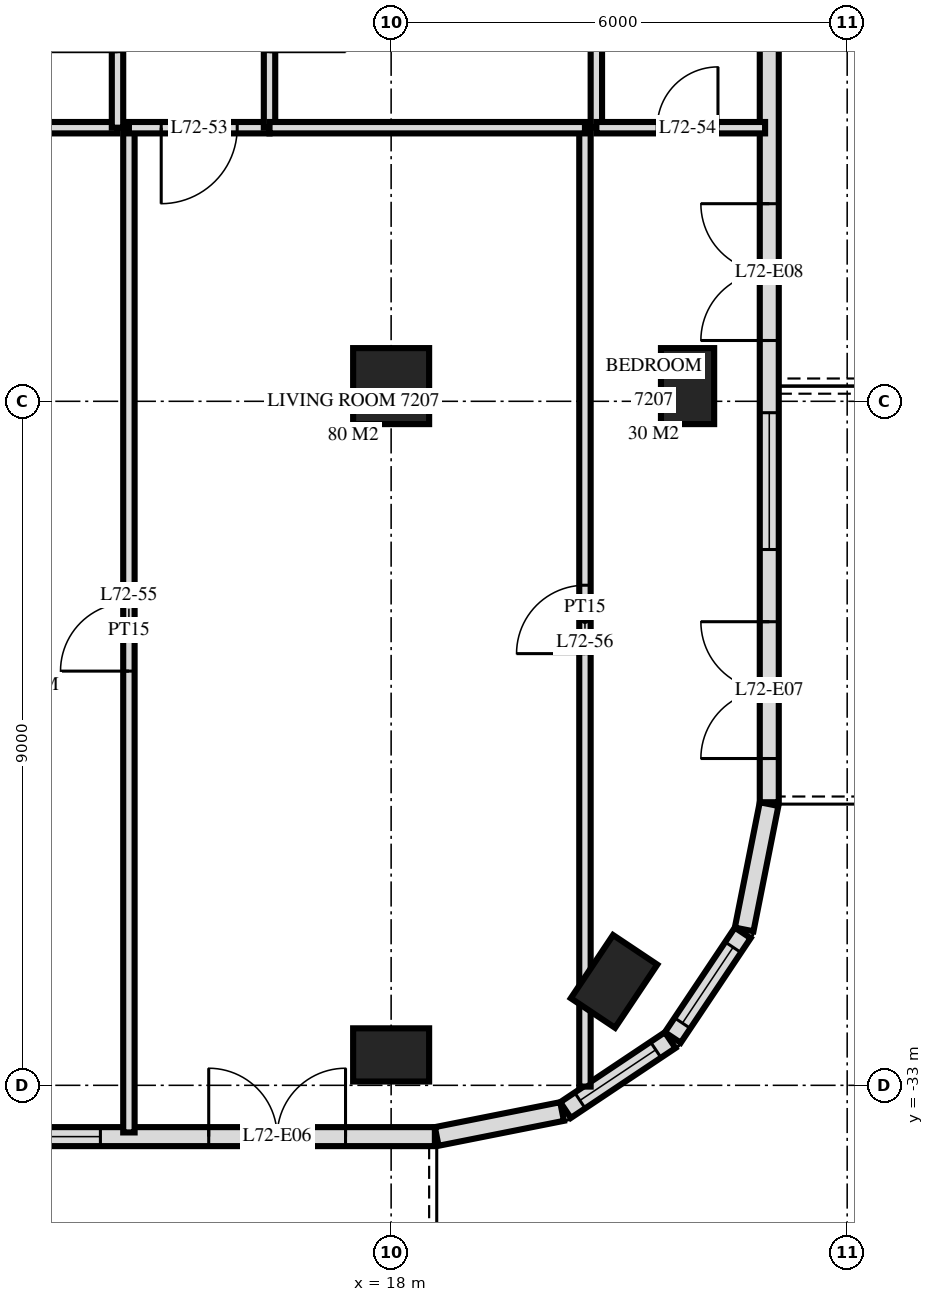
"""IFC4 building model, lengths in metres.
Left out: names, types, materials, properties, quantities, classifications, styles, units other than length and angle.
Written with IfcOpenShell. Run it as: python <this file> out.ifc"""

import sys

from ifc_helpers import new_model, si_unit, direction, frame, frame_2d, origin, origin_2d, place, context, subcontext, project, spatial, rectangle, extrude, element, fill, save


model = new_model("IFC4")
c1 = context("Model", 3, precision=1e-05, world=origin(), true_north=direction((0.0, 1.0)))
c2 = subcontext(c1, "Body", "Model", "MODEL_VIEW")
j1 = project(units=[si_unit("LENGTHUNIT", "METRE"), si_unit("PLANEANGLEUNIT", "RADIAN")], contexts=[c1])
p1 = place(None, origin())
s1 = spatial("IfcSite", under=j1, at=p1, CompositionType="ELEMENT")
p2 = place(p1, origin())
s2 = spatial("IfcBuilding", under=s1, at=p2, CompositionType="ELEMENT")
p3 = place(p2, frame((0.0, 0.0, 273.6)))
s3 = spatial("IfcBuildingStorey", under=s2, at=p3, CompositionType="ELEMENT", Elevation=273.6)
p4 = place(p3, frame((18.0, -32.6, 0.0), z_axis=(0.0, 0.0, 1.0), x_axis=(1.0, 0.0, 0.0)))
e1 = element("IfcColumn", 1, at=p4, inside=s3, PredefinedType="COLUMN", context=c2, shape_type="SweptSolid", body=[
    extrude(rectangle(XDim=1.0, YDim=0.7, at=origin_2d()), origin(), (0.0, 0.0, 1.0), 3.5),
])
p5 = place(p3, frame((18.0, -23.8, 0.0), z_axis=(0.0, 0.0, 1.0), x_axis=(1.0, 0.0, 0.0)))
e2 = element("IfcColumn", 2, at=p5, inside=s3, PredefinedType="COLUMN", context=c2, shape_type="SweptSolid", body=[
    extrude(rectangle(XDim=1.0, YDim=1.0, at=origin_2d()), origin(), (0.0, 0.0, 1.0), 3.5),
])
for number, where, z_axis, x_axis in (
    (3, (20.933, -31.633, 0.0), (0.0, 0.0, 1.0), (0.556, 0.831, 0.0)),
    (4, (21.9, -23.8, 0.0), (0.0, 0.0, 1.0), (0.0, 1.0, 0.0)),
):
    element("IfcColumn", number, at=place(p3, frame(where, z_axis=z_axis, x_axis=x_axis)), inside=s3, PredefinedType="COLUMN", context=c2, shape_type="SweptSolid", body=[
        extrude(rectangle(XDim=1.0, YDim=0.7, at=origin_2d()), origin(), (0.0, 0.0, 1.0), 3.5),
    ])
p6 = place(p3, frame((-18.575, -33.675, 0.0), z_axis=(0.0, 0.0, 1.0), x_axis=(1.0, 0.0, 0.0)))
e5 = element("IfcWall", 5, at=p6, inside=s3, PredefinedType="SOLIDWALL", context=c2, shape_type="SweptSolid", body=[
    extrude(rectangle(XDim=37.151, YDim=0.25, at=frame_2d((18.575, 0.0))), origin(), (0.0, 0.0, 1.0), 3.22),
])
p7 = place(p6, frame((4.175, 0.0, 0.0)))
e6 = element("IfcOpeningElement", 6, at=p7, cuts=e5, PredefinedType="OPENING", context=c2, shape_type="SweptSolid", body=[
    extrude(rectangle(XDim=1.8, YDim=2.4, at=frame_2d((0.9, 1.2))), frame((0.0, 0.135, 0.0), z_axis=(0.0, -1.0, 0.0), x_axis=(1.0, 0.0, 0.0)), (0.0, 0.0, 1.0), 0.27),
])
p8 = place(p6, frame((7.512, 0.0, 0.0)))
e7 = element("IfcOpeningElement", 7, at=p8, cuts=e5, PredefinedType="OPENING", context=c2, shape_type="SweptSolid", body=[
    extrude(rectangle(XDim=1.8, YDim=2.4, at=frame_2d((0.9, 1.2))), frame((0.0, 0.135, 0.0), z_axis=(0.0, -1.0, 0.0), x_axis=(1.0, 0.0, 0.0)), (0.0, 0.0, 1.0), 0.27),
])
p9 = place(p6, frame((10.287, 0.0, 0.9)))
e8 = element("IfcOpeningElement", 8, at=p9, cuts=e5, PredefinedType="OPENING", context=c2, shape_type="SweptSolid", body=[
    extrude(rectangle(XDim=1.8, YDim=1.5, at=frame_2d((0.9, 0.75))), frame((0.0, 0.135, 0.0), z_axis=(0.0, -1.0, 0.0), x_axis=(1.0, 0.0, 0.0)), (0.0, 0.0, 1.0), 0.27),
])
p10 = place(p6, frame((12.875, 0.0, 0.9)))
e9 = element("IfcOpeningElement", 9, at=p10, cuts=e5, PredefinedType="OPENING", context=c2, shape_type="SweptSolid", body=[
    extrude(rectangle(XDim=2.4, YDim=1.5, at=frame_2d((1.2, 0.75))), frame((0.0, 0.135, 0.0), z_axis=(0.0, -1.0, 0.0), x_axis=(1.0, 0.0, 0.0)), (0.0, 0.0, 1.0), 0.27),
])
p11 = place(p6, frame((16.175, 0.0, 0.0)))
e10 = element("IfcOpeningElement", 10, at=p11, cuts=e5, PredefinedType="OPENING", context=c2, shape_type="SweptSolid", body=[
    extrude(rectangle(XDim=1.8, YDim=2.4, at=frame_2d((0.9, 1.2))), frame((0.0, 0.135, 0.0), z_axis=(0.0, -1.0, 0.0), x_axis=(1.0, 0.0, 0.0)), (0.0, 0.0, 1.0), 0.27),
])
p12 = place(p6, frame((19.175, 0.0, 0.0)))
e11 = element("IfcOpeningElement", 11, at=p12, cuts=e5, PredefinedType="OPENING", context=c2, shape_type="SweptSolid", body=[
    extrude(rectangle(XDim=1.8, YDim=2.4, at=frame_2d((0.9, 1.2))), frame((0.0, 0.135, 0.0), z_axis=(0.0, -1.0, 0.0), x_axis=(1.0, 0.0, 0.0)), (0.0, 0.0, 1.0), 0.27),
])
p13 = place(p6, frame((21.875, 0.0, 0.9)))
e12 = element("IfcOpeningElement", 12, at=p13, cuts=e5, PredefinedType="OPENING", context=c2, shape_type="SweptSolid", body=[
    extrude(rectangle(XDim=2.4, YDim=1.5, at=frame_2d((1.2, 0.75))), frame((0.0, 0.135, 0.0), z_axis=(0.0, -1.0, 0.0), x_axis=(1.0, 0.0, 0.0)), (0.0, 0.0, 1.0), 0.27),
])
p14 = place(p6, frame((25.175, 0.0, 0.0)))
e13 = element("IfcOpeningElement", 13, at=p14, cuts=e5, PredefinedType="OPENING", context=c2, shape_type="SweptSolid", body=[
    extrude(rectangle(XDim=1.8, YDim=2.4, at=frame_2d((0.9, 1.2))), frame((0.0, 0.135, 0.0), z_axis=(0.0, -1.0, 0.0), x_axis=(1.0, 0.0, 0.0)), (0.0, 0.0, 1.0), 0.27),
])
p15 = place(p6, frame((27.875, 0.0, 0.9)))
e14 = element("IfcOpeningElement", 14, at=p15, cuts=e5, PredefinedType="OPENING", context=c2, shape_type="SweptSolid", body=[
    extrude(rectangle(XDim=2.4, YDim=1.5, at=frame_2d((1.2, 0.75))), frame((0.0, 0.135, 0.0), z_axis=(0.0, -1.0, 0.0), x_axis=(1.0, 0.0, 0.0)), (0.0, 0.0, 1.0), 0.27),
])
p16 = place(p6, frame((30.95, 0.0, 0.9)))
e15 = element("IfcOpeningElement", 15, at=p16, cuts=e5, PredefinedType="OPENING", context=c2, shape_type="SweptSolid", body=[
    extrude(rectangle(XDim=1.8, YDim=1.5, at=frame_2d((0.9, 0.75))), frame((0.0, 0.135, 0.0), z_axis=(0.0, -1.0, 0.0), x_axis=(1.0, 0.0, 0.0)), (0.0, 0.0, 1.0), 0.27),
])
p17 = place(p6, frame((34.175, 0.0, 0.0)))
e16 = element("IfcOpeningElement", 16, at=p17, cuts=e5, PredefinedType="OPENING", context=c2, shape_type="SweptSolid", body=[
    extrude(rectangle(XDim=1.8, YDim=2.4, at=frame_2d((0.9, 1.2))), frame((0.0, 0.135, 0.0), z_axis=(0.0, -1.0, 0.0), x_axis=(1.0, 0.0, 0.0)), (0.0, 0.0, 1.0), 0.27),
])
p18 = place(p3, frame((18.6, -33.673, 0.0), z_axis=(0.0, 0.0, 1.0), x_axis=(0.980770110232, 0.195166572128, 0.0)))
e17 = element("IfcWall", 17, at=p18, inside=s3, PredefinedType="SOLIDWALL", context=c2, shape_type="SweptSolid", body=[
    extrude(rectangle(XDim=1.681, YDim=0.25, at=frame_2d((0.841, 0.0))), origin(), (0.0, 0.0, 1.0), 3.22),
])
p19 = place(p3, frame((20.294, -33.326, 0.0), z_axis=(0.0, 0.0, 1.0), x_axis=(0.831482937015, 0.55555029066, 0.0)))
e18 = element("IfcWall", 18, at=p19, inside=s3, PredefinedType="SOLIDWALL", context=c2, shape_type="SweptSolid", body=[
    extrude(rectangle(XDim=1.656, YDim=0.25, at=frame_2d((0.828, 0.0))), origin(), (0.0, 0.0, 1.0), 3.22),
])
p20 = place(p19, frame((0.228, 0.0, 0.9)))
e19 = element("IfcOpeningElement", 19, at=p20, cuts=e18, PredefinedType="OPENING", context=c2, shape_type="SweptSolid", body=[
    extrude(rectangle(XDim=1.2, YDim=1.5, at=frame_2d((0.6, 0.75))), frame((0.0, 0.135, 0.0), z_axis=(0.0, -1.0, 0.0), x_axis=(1.0, 0.0, 0.0)), (0.0, 0.0, 1.0), 0.27),
])
p21 = place(p3, frame((21.706, -32.371, 0.0), z_axis=(0.0, 0.0, 1.0), x_axis=(0.55555029066, 0.831482937015, 0.0)))
e20 = element("IfcWall", 20, at=p21, inside=s3, PredefinedType="SOLIDWALL", context=c2, shape_type="SweptSolid", body=[
    extrude(rectangle(XDim=1.656, YDim=0.25, at=frame_2d((0.828, 0.0))), origin(), (0.0, 0.0, 1.0), 3.22),
])
p22 = place(p21, frame((0.228, 0.0, 0.9)))
e21 = element("IfcOpeningElement", 21, at=p22, cuts=e20, PredefinedType="OPENING", context=c2, shape_type="SweptSolid", body=[
    extrude(rectangle(XDim=1.2, YDim=1.5, at=frame_2d((0.6, 0.75))), frame((0.0, 0.135, 0.0), z_axis=(0.0, -1.0, 0.0), x_axis=(1.0, 0.0, 0.0)), (0.0, 0.0, 1.0), 0.27),
])
p23 = place(p3, frame((22.645, -30.949, 0.0), z_axis=(0.0, 0.0, 1.0), x_axis=(0.19513878023, 0.980775640221, 0.0)))
e22 = element("IfcWall", 22, at=p23, inside=s3, PredefinedType="SOLIDWALL", context=c2, shape_type="SweptSolid", body=[
    extrude(rectangle(XDim=1.681, YDim=0.25, at=frame_2d((0.841, 0.0))), origin(), (0.0, 0.0, 1.0), 3.22),
])
p24 = place(p3, frame((22.975, -29.275, 0.0), z_axis=(0.0, 0.0, 1.0), x_axis=(0.0, 1.0, 0.0)))
e23 = element("IfcWall", 23, at=p24, inside=s3, PredefinedType="SOLIDWALL", context=c2, shape_type="SweptSolid", body=[
    extrude(rectangle(XDim=25.951, YDim=0.25, at=frame_2d((12.975, 0.0))), origin(), (0.0, 0.0, 1.0), 3.22),
])
p25 = place(p24, frame((0.575, 0.0, 0.0)))
e24 = element("IfcOpeningElement", 24, at=p25, cuts=e23, PredefinedType="OPENING", context=c2, shape_type="SweptSolid", body=[
    extrude(rectangle(XDim=1.8, YDim=2.4, at=frame_2d((0.9, 1.2))), frame((0.0, 0.135, 0.0), z_axis=(0.0, -1.0, 0.0), x_axis=(1.0, 0.0, 0.0)), (0.0, 0.0, 1.0), 0.27),
])
p26 = place(p24, frame((3.325, 0.0, 0.9)))
e25 = element("IfcOpeningElement", 25, at=p26, cuts=e23, PredefinedType="OPENING", context=c2, shape_type="SweptSolid", body=[
    extrude(rectangle(XDim=1.8, YDim=1.5, at=frame_2d((0.9, 0.75))), frame((0.0, 0.135, 0.0), z_axis=(0.0, -1.0, 0.0), x_axis=(1.0, 0.0, 0.0)), (0.0, 0.0, 1.0), 0.27),
])
p27 = place(p24, frame((6.075, 0.0, 0.0)))
e26 = element("IfcOpeningElement", 26, at=p27, cuts=e23, PredefinedType="OPENING", context=c2, shape_type="SweptSolid", body=[
    extrude(rectangle(XDim=1.8, YDim=2.4, at=frame_2d((0.9, 1.2))), frame((0.0, 0.135, 0.0), z_axis=(0.0, -1.0, 0.0), x_axis=(1.0, 0.0, 0.0)), (0.0, 0.0, 1.0), 0.27),
])
p28 = place(p24, frame((12.475, 0.0, 0.9)))
e27 = element("IfcOpeningElement", 27, at=p28, cuts=e23, PredefinedType="OPENING", context=c2, shape_type="SweptSolid", body=[
    extrude(rectangle(XDim=1.2, YDim=1.5, at=frame_2d((0.6, 0.75))), frame((0.0, 0.135, 0.0), z_axis=(0.0, -1.0, 0.0), x_axis=(1.0, 0.0, 0.0)), (0.0, 0.0, 1.0), 0.27),
])
p29 = place(p24, frame((16.175, 0.0, 0.0)))
e28 = element("IfcOpeningElement", 28, at=p29, cuts=e23, PredefinedType="OPENING", context=c2, shape_type="SweptSolid", body=[
    extrude(rectangle(XDim=1.8, YDim=2.4, at=frame_2d((0.9, 1.2))), frame((0.0, 0.135, 0.0), z_axis=(0.0, -1.0, 0.0), x_axis=(1.0, 0.0, 0.0)), (0.0, 0.0, 1.0), 0.27),
])
p30 = place(p24, frame((20.925, 0.0, 0.0)))
e29 = element("IfcOpeningElement", 29, at=p30, cuts=e23, PredefinedType="OPENING", context=c2, shape_type="SweptSolid", body=[
    extrude(rectangle(XDim=1.8, YDim=2.4, at=frame_2d((0.9, 1.2))), frame((0.0, 0.135, 0.0), z_axis=(0.0, -1.0, 0.0), x_axis=(1.0, 0.0, 0.0)), (0.0, 0.0, 1.0), 0.27),
])
p31 = place(p3, frame((20.7, -20.4, 0.0), z_axis=(0.0, 0.0, 1.0), x_axis=(0.0, 1.0, 0.0)))
e30 = element("IfcWall", 30, at=p31, inside=s3, PredefinedType="PARTITIONING", context=c2, shape_type="SweptSolid", body=[
    extrude(rectangle(XDim=3.0, YDim=0.15, at=frame_2d((1.5, 0.0))), origin(), (0.0, 0.0, 1.0), 3.22),
])
p32 = place(p3, frame((20.55, -33.017, 0.0), z_axis=(0.0, 0.0, 1.0), x_axis=(0.0, 1.0, 0.0)))
e31 = element("IfcWall", 31, at=p32, inside=s3, PredefinedType="PARTITIONING", context=c2, shape_type="SweptSolid", body=[
    extrude(rectangle(XDim=12.617, YDim=0.15, at=frame_2d((6.308, 0.0))), origin(), (0.0, 0.0, 1.0), 3.22),
])
p33 = place(p32, frame((5.697, 0.0, 0.0)))
e32 = element("IfcOpeningElement", 32, at=p33, cuts=e31, PredefinedType="OPENING", context=c2, shape_type="SweptSolid", body=[
    extrude(rectangle(XDim=0.9, YDim=2.1, at=frame_2d((0.45, 1.05))), frame((0.0, 0.085, 0.0), z_axis=(0.0, -1.0, 0.0), x_axis=(1.0, 0.0, 0.0)), (0.0, 0.0, 1.0), 0.17),
])
p34 = place(p3, frame((16.4, -20.4, 0.0), z_axis=(0.0, 0.0, 1.0), x_axis=(0.0, 1.0, 0.0)))
e33 = element("IfcWall", 33, at=p34, inside=s3, PredefinedType="PARTITIONING", context=c2, shape_type="SweptSolid", body=[
    extrude(rectangle(XDim=3.0, YDim=0.15, at=frame_2d((1.5, 0.0))), origin(), (0.0, 0.0, 1.0), 3.22),
])
p35 = place(p34, frame((1.0, 0.0, 0.0)))
e34 = element("IfcOpeningElement", 34, at=p35, cuts=e33, PredefinedType="OPENING", context=c2, shape_type="SweptSolid", body=[
    extrude(rectangle(XDim=1.0, YDim=2.1, at=frame_2d((0.5, 1.05))), frame((0.0, 0.085, 0.0), z_axis=(0.0, -1.0, 0.0), x_axis=(1.0, 0.0, 0.0)), (0.0, 0.0, 1.0), 0.17),
])
p36 = place(p3, frame((14.55, -33.62, 0.0), z_axis=(0.0, 0.0, 1.0), x_axis=(0.0, 1.0, 0.0)))
e35 = element("IfcWall", 35, at=p36, inside=s3, PredefinedType="PARTITIONING", context=c2, shape_type="SweptSolid", body=[
    extrude(rectangle(XDim=13.22, YDim=0.15, at=frame_2d((6.61, 0.0))), origin(), (0.0, 0.0, 1.0), 3.22),
])
p37 = place(p36, frame((6.07, 0.0, 0.0)))
e36 = element("IfcOpeningElement", 36, at=p37, cuts=e35, PredefinedType="OPENING", context=c2, shape_type="SweptSolid", body=[
    extrude(rectangle(XDim=0.9, YDim=2.1, at=frame_2d((0.45, 1.05))), frame((0.0, 0.085, 0.0), z_axis=(0.0, -1.0, 0.0), x_axis=(1.0, 0.0, 0.0)), (0.0, 0.0, 1.0), 0.17),
])
p38 = place(p3, frame((14.4, -20.4, 0.0), z_axis=(0.0, 0.0, 1.0), x_axis=(0.0, 1.0, 0.0)))
e37 = element("IfcWall", 37, at=p38, inside=s3, PredefinedType="PARTITIONING", context=c2, shape_type="SweptSolid", body=[
    extrude(rectangle(XDim=3.0, YDim=0.15, at=frame_2d((1.5, 0.0))), origin(), (0.0, 0.0, 1.0), 3.22),
])
p39 = place(p38, frame((1.0, 0.0, 0.0)))
e38 = element("IfcOpeningElement", 38, at=p39, cuts=e37, PredefinedType="OPENING", context=c2, shape_type="SweptSolid", body=[
    extrude(rectangle(XDim=1.0, YDim=2.1, at=frame_2d((0.5, 1.05))), frame((0.0, 0.085, 0.0), z_axis=(0.0, -1.0, 0.0), x_axis=(1.0, 0.0, 0.0)), (0.0, 0.0, 1.0), 0.17),
])
p40 = place(p3, frame((14.55, -20.4, 0.0), z_axis=(0.0, 0.0, 1.0), x_axis=(1.0, 0.0, 0.0)))
e39 = element("IfcWall", 39, at=p40, inside=s3, PredefinedType="PARTITIONING", context=c2, shape_type="SweptSolid", body=[
    extrude(rectangle(XDim=1.85, YDim=0.15, at=frame_2d((0.925, 0.0))), origin(), (0.0, 0.0, 1.0), 3.22),
])
p41 = place(p40, frame((0.425, 0.0, 0.0)))
e40 = element("IfcOpeningElement", 40, at=p41, cuts=e39, PredefinedType="OPENING", context=c2, shape_type="SweptSolid", body=[
    extrude(rectangle(XDim=1.0, YDim=2.1, at=frame_2d((0.5, 1.05))), frame((0.0, 0.085, 0.0), z_axis=(0.0, -1.0, 0.0), x_axis=(1.0, 0.0, 0.0)), (0.0, 0.0, 1.0), 0.17),
])
p42 = place(p3, frame((12.0, -20.4, 0.0), z_axis=(0.0, 0.0, 1.0), x_axis=(1.0, 0.0, 0.0)))
e41 = element("IfcWall", 41, at=p42, inside=s3, PredefinedType="PARTITIONING", context=c2, shape_type="SweptSolid", body=[
    extrude(rectangle(XDim=2.4, YDim=0.15, at=frame_2d((1.2, 0.0))), origin(), (0.0, 0.0, 1.0), 3.22),
])
p43 = place(p3, frame((16.4, -20.4, 0.0), z_axis=(0.0, 0.0, 1.0), x_axis=(1.0, 0.0, 0.0)))
e42 = element("IfcWall", 42, at=p43, inside=s3, PredefinedType="PARTITIONING", context=c2, shape_type="SweptSolid", body=[
    extrude(rectangle(XDim=4.15, YDim=0.15, at=frame_2d((2.075, 0.0))), origin(), (0.0, 0.0, 1.0), 3.22),
])
p44 = place(p3, frame((20.7, -20.4, 0.0), z_axis=(0.0, 0.0, 1.0), x_axis=(1.0, 0.0, 0.0)))
e43 = element("IfcWall", 43, at=p44, inside=s3, PredefinedType="PARTITIONING", context=c2, shape_type="SweptSolid", body=[
    extrude(rectangle(XDim=2.22, YDim=0.15, at=frame_2d((1.11, 0.0))), origin(), (0.0, 0.0, 1.0), 3.22),
])
p45 = place(p44, frame((0.8, 0.0, 0.0)))
e44 = element("IfcOpeningElement", 44, at=p45, cuts=e43, PredefinedType="OPENING", context=c2, shape_type="SweptSolid", body=[
    extrude(rectangle(XDim=0.8, YDim=2.1, at=frame_2d((0.4, 1.05))), frame((0.0, 0.085, 0.0), z_axis=(0.0, -1.0, 0.0), x_axis=(1.0, 0.0, 0.0)), (0.0, 0.0, 1.0), 0.17),
])
p46 = place(p20, origin())
e45 = element("IfcWindow", 45, at=p46, inside=s3, PartitioningType="SINGLE_PANEL", PredefinedType="WINDOW", context=c2, shape_type="SweptSolid", body=[
    extrude(rectangle(XDim=1.2, YDim=1.5, at=frame_2d((0.6, 0.75))), frame((0.0, 0.03, 0.0), z_axis=(0.0, -1.0, 0.0), x_axis=(1.0, 0.0, 0.0)), (0.0, 0.0, 1.0), 0.06),
])
fill(e19, e45)
p47 = place(p22, origin())
e46 = element("IfcWindow", 46, at=p47, inside=s3, PartitioningType="SINGLE_PANEL", PredefinedType="WINDOW", context=c2, shape_type="SweptSolid", body=[
    extrude(rectangle(XDim=1.2, YDim=1.5, at=frame_2d((0.6, 0.75))), frame((0.0, 0.03, 0.0), z_axis=(0.0, -1.0, 0.0), x_axis=(1.0, 0.0, 0.0)), (0.0, 0.0, 1.0), 0.06),
])
fill(e21, e46)
p48 = place(p16, origin())
e47 = element("IfcWindow", 47, at=p48, inside=s3, PartitioningType="SINGLE_PANEL", PredefinedType="WINDOW", context=c2, shape_type="SweptSolid", body=[
    extrude(rectangle(XDim=1.8, YDim=1.5, at=frame_2d((0.9, 0.75))), frame((0.0, 0.03, 0.0), z_axis=(0.0, -1.0, 0.0), x_axis=(1.0, 0.0, 0.0)), (0.0, 0.0, 1.0), 0.06),
])
fill(e15, e47)
p49 = place(p17, origin())
e48 = element("IfcDoor", 48, at=p49, inside=s3, OperationType="DOUBLE_DOOR_SINGLE_SWING", PredefinedType="DOOR", context=c2, shape_type="SweptSolid", body=[
    extrude(rectangle(XDim=1.8, YDim=2.4, at=frame_2d((0.9, 1.2))), frame((0.0, 0.025, 0.0), z_axis=(0.0, -1.0, 0.0), x_axis=(1.0, 0.0, 0.0)), (0.0, 0.0, 1.0), 0.05),
])
fill(e16, e48)
p50 = place(p25, origin())
e49 = element("IfcDoor", 49, at=p50, inside=s3, OperationType="DOUBLE_DOOR_SINGLE_SWING", PredefinedType="DOOR", context=c2, shape_type="SweptSolid", body=[
    extrude(rectangle(XDim=1.8, YDim=2.4, at=frame_2d((0.9, 1.2))), frame((0.0, 0.025, 0.0), z_axis=(0.0, -1.0, 0.0), x_axis=(1.0, 0.0, 0.0)), (0.0, 0.0, 1.0), 0.05),
])
fill(e24, e49)
p51 = place(p26, origin())
e50 = element("IfcWindow", 50, at=p51, inside=s3, PartitioningType="SINGLE_PANEL", PredefinedType="WINDOW", context=c2, shape_type="SweptSolid", body=[
    extrude(rectangle(XDim=1.8, YDim=1.5, at=frame_2d((0.9, 0.75))), frame((0.0, 0.03, 0.0), z_axis=(0.0, -1.0, 0.0), x_axis=(1.0, 0.0, 0.0)), (0.0, 0.0, 1.0), 0.06),
])
fill(e25, e50)
p52 = place(p27, origin())
e51 = element("IfcDoor", 51, at=p52, inside=s3, OperationType="DOUBLE_DOOR_SINGLE_SWING", PredefinedType="DOOR", context=c2, shape_type="SweptSolid", body=[
    extrude(rectangle(XDim=1.8, YDim=2.4, at=frame_2d((0.9, 1.2))), frame((0.0, 0.025, 0.0), z_axis=(0.0, -1.0, 0.0), x_axis=(1.0, 0.0, 0.0)), (0.0, 0.0, 1.0), 0.05),
])
fill(e26, e51)
p53 = place(p41, frame((0.5, 0.0, 0.0), z_axis=(0.0, 0.0, 1.0), x_axis=(-1.0, 0.0, 0.0)))
e52 = element("IfcDoor", 52, at=p53, inside=s3, OperationType="SINGLE_SWING_LEFT", PredefinedType="DOOR", context=c2, shape_type="SweptSolid", body=[
    extrude(rectangle(XDim=1.0, YDim=2.1, at=frame_2d((0.0, 1.05))), frame((0.0, -0.025, 0.0), z_axis=(0.0, 1.0, 0.0), x_axis=(-1.0, 0.0, 0.0)), (0.0, 0.0, 1.0), 0.05),
])
fill(e40, e52)
p54 = place(p45, origin())
e53 = element("IfcDoor", 53, at=p54, inside=s3, OperationType="SINGLE_SWING_LEFT", PredefinedType="DOOR", context=c2, shape_type="SweptSolid", body=[
    extrude(rectangle(XDim=0.8, YDim=2.1, at=frame_2d((0.4, 1.05))), frame((0.0, 0.025, 0.0), z_axis=(0.0, -1.0, 0.0), x_axis=(1.0, 0.0, 0.0)), (0.0, 0.0, 1.0), 0.05),
])
fill(e44, e53)
p55 = place(p37, origin())
e54 = element("IfcDoor", 54, at=p55, inside=s3, OperationType="SINGLE_SWING_RIGHT", PredefinedType="DOOR", context=c2, shape_type="SweptSolid", body=[
    extrude(rectangle(XDim=0.9, YDim=2.1, at=frame_2d((0.45, 1.05))), frame((0.0, 0.025, 0.0), z_axis=(0.0, -1.0, 0.0), x_axis=(1.0, 0.0, 0.0)), (0.0, 0.0, 1.0), 0.05),
])
fill(e36, e54)
p56 = place(p33, origin())
e55 = element("IfcDoor", 55, at=p56, inside=s3, OperationType="SINGLE_SWING_RIGHT", PredefinedType="DOOR", context=c2, shape_type="SweptSolid", body=[
    extrude(rectangle(XDim=0.9, YDim=2.1, at=frame_2d((0.45, 1.05))), frame((0.0, 0.025, 0.0), z_axis=(0.0, -1.0, 0.0), x_axis=(1.0, 0.0, 0.0)), (0.0, 0.0, 1.0), 0.05),
])
fill(e32, e55)
save(model, sys.argv[1])
